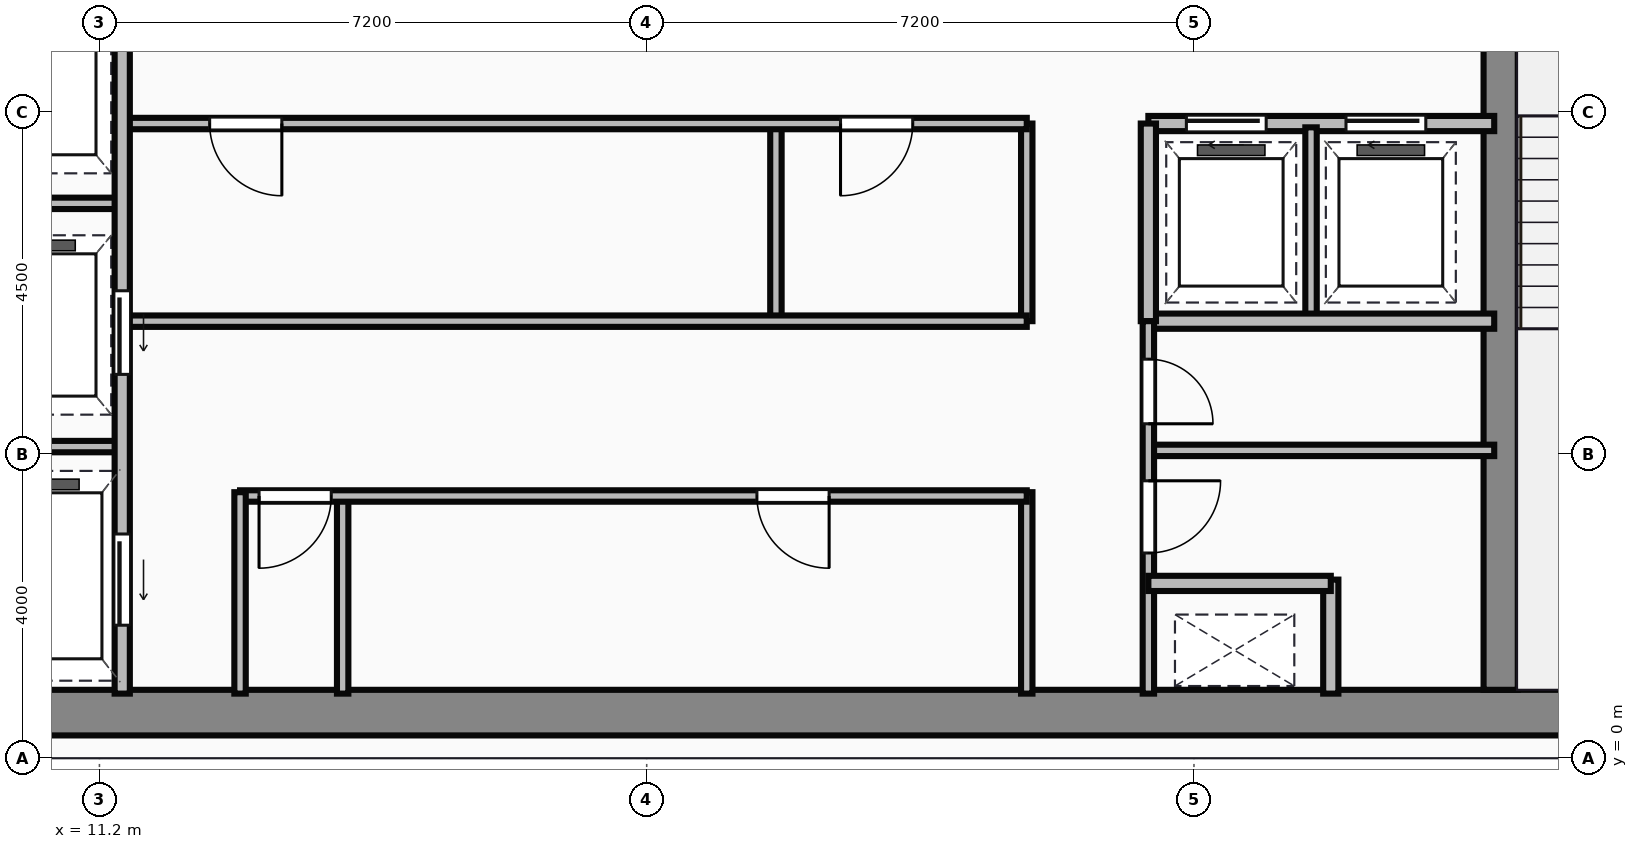
"""IFC4 building model, lengths in metres.
Left out: names, types, materials, properties, quantities, classifications, styles, units other than length and angle.
Written with IfcOpenShell. Run it as: python <this file> out.ifc"""

import sys

from ifc_helpers import new_model, si_unit, direction, frame, frame_2d, origin, place, context, subcontext, project, spatial, rectangle, extrude, source, transform, mapped, element, fill, save


model = new_model("IFC4")
c1 = context("Model", 3, precision=1e-05, world=origin(), true_north=direction((0.0, 1.0)))
c2 = subcontext(c1, "Body", "Model", "MODEL_VIEW")
j1 = project(units=[si_unit("LENGTHUNIT", "METRE"), si_unit("PLANEANGLEUNIT", "RADIAN")], contexts=[c1])
p1 = place(None, origin())
s1 = spatial("IfcSite", under=j1, at=p1, CompositionType="ELEMENT")
p2 = place(p1, origin())
s2 = spatial("IfcBuilding", under=s1, at=p2, CompositionType="ELEMENT")
p3 = place(p2, frame((0.0, 0.0, 273.4)))
s3 = spatial("IfcBuildingStorey", under=s2, at=p3, CompositionType="ELEMENT", Elevation=273.4)
m1 = source(origin(), c2, "Body", "SweptSolid", [
    extrude(rectangle(XDim=29.5, YDim=0.6, at=frame_2d((14.75, 0.0))), origin(), (0.0, 0.0, 1.0), 3.65),
])
p4 = place(p3, frame((4.5, 0.6, 0.0), z_axis=(0.0, 0.0, 1.0), x_axis=(1.0, 0.0, 0.0)))
e1 = element("IfcWall", 1, at=p4, inside=s3, PredefinedType="SHEAR", context=c2, shape_type="MappedRepresentation", body=[
    mapped(m1, transform((0.0, 0.0, 0.0))),
])
m2 = source(origin(), c2, "Body", "SweptSolid", [
    extrude(rectangle(XDim=12.5, YDim=0.45, at=frame_2d((6.25, 0.0))), origin(), (0.0, 0.0, 1.0), 3.65),
])
p5 = place(p3, frame((29.635, 0.9, 0.0), z_axis=(0.0, 0.0, 1.0), x_axis=(0.0, 1.0, 0.0)))
e2 = element("IfcWall", 2, at=p5, inside=s3, PredefinedType="SHEAR", context=c2, shape_type="MappedRepresentation", body=[
    mapped(m2, transform((0.0, 0.0, 0.0))),
])
m3 = source(origin(), c2, "Body", "SweptSolid", [
    extrude(rectangle(XDim=9.6, YDim=0.2, at=frame_2d((4.8, 0.0))), origin(), (0.0, 0.0, 1.0), 3.4),
])
p6 = place(p3, frame((11.5, 0.85, 0.0), z_axis=(0.0, 0.0, 1.0), x_axis=(0.0, 1.0, 0.0)))
e3 = element("IfcWall", 3, at=p6, inside=s3, PredefinedType="PARTITIONING", context=c2, shape_type="MappedRepresentation", body=[
    mapped(m3, transform((0.0, 0.0, 0.0))),
])
p7 = place(p6, frame((4.2, 0.0, 0.0)))
e4 = element("IfcOpeningElement", 4, at=p7, cuts=e3, PredefinedType="OPENING", context=c2, shape_type="SweptSolid", body=[
    extrude(rectangle(XDim=1.1, YDim=2.15, at=frame_2d((0.55, 1.075))), frame((0.0, 0.11, 0.0), z_axis=(0.0, -1.0, 0.0), x_axis=(1.0, 0.0, 0.0)), (0.0, 0.0, 1.0), 0.22),
])
p8 = place(p6, frame((0.9, 0.0, 0.0)))
e5 = element("IfcOpeningElement", 5, at=p8, cuts=e3, PredefinedType="OPENING", context=c2, shape_type="SweptSolid", body=[
    extrude(rectangle(XDim=1.2, YDim=2.15, at=frame_2d((0.6, 1.075))), frame((0.0, 0.11, 0.0), z_axis=(0.0, -1.0, 0.0), x_axis=(1.0, 0.0, 0.0)), (0.0, 0.0, 1.0), 0.22),
])
m4 = source(origin(), c2, "Body", "SweptSolid", [
    extrude(rectangle(XDim=2.4, YDim=0.15, at=frame_2d((1.2, 0.0))), origin(), (0.0, 0.0, 1.0), 3.4),
])
for number, where, z_axis, x_axis in (
    (6, (9.1, 4.1, 0.0), (0.0, 0.0, 1.0), (1.0, 0.0, 0.0)),
    (7, (9.1, 7.3, 0.0), (0.0, 0.0, 1.0), (1.0, 0.0, 0.0)),
):
    element("IfcWall", number, at=place(p3, frame(where, z_axis=z_axis, x_axis=x_axis)), inside=s3, PredefinedType="PARTITIONING", context=c2, shape_type="MappedRepresentation", body=[
        mapped(m4, transform((0.0, 0.0, 0.0))),
    ])
m5 = source(origin(), c2, "Body", "SweptSolid", [
    extrude(rectangle(XDim=2.65, YDim=0.15, at=frame_2d((1.325, 0.0))), origin(), (0.0, 0.0, 1.0), 3.4),
])
p9 = place(p3, frame((13.05, 0.85, 0.0), z_axis=(0.0, 0.0, 1.0), x_axis=(0.0, 1.0, 0.0)))
e8 = element("IfcWall", 8, at=p9, inside=s3, PredefinedType="PARTITIONING", context=c2, shape_type="MappedRepresentation", body=[
    mapped(m5, transform((0.0, 0.0, 0.0))),
])
m6 = source(origin(), c2, "Body", "SweptSolid", [
    extrude(rectangle(XDim=10.35, YDim=0.15, at=frame_2d((5.175, 0.0))), origin(), (0.0, 0.0, 1.0), 3.4),
])
p10 = place(p3, frame((13.05, 3.45, 0.0), z_axis=(0.0, 0.0, 1.0), x_axis=(1.0, 0.0, 0.0)))
e9 = element("IfcWall", 9, at=p10, inside=s3, PredefinedType="PARTITIONING", context=c2, shape_type="MappedRepresentation", body=[
    mapped(m6, transform((0.0, 0.0, 0.0))),
])
p11 = place(p10, frame((0.25, 0.0, 0.0)))
e10 = element("IfcOpeningElement", 10, at=p11, cuts=e9, PredefinedType="OPENING", context=c2, shape_type="SweptSolid", body=[
    extrude(rectangle(XDim=0.95, YDim=2.15, at=frame_2d((0.475, 1.075))), frame((0.0, 0.085, 0.0), z_axis=(0.0, -1.0, 0.0), x_axis=(1.0, 0.0, 0.0)), (0.0, 0.0, 1.0), 0.17),
])
p12 = place(p10, frame((6.8, 0.0, 0.0)))
e11 = element("IfcOpeningElement", 11, at=p12, cuts=e9, PredefinedType="OPENING", context=c2, shape_type="SweptSolid", body=[
    extrude(rectangle(XDim=0.95, YDim=2.15, at=frame_2d((0.475, 1.075))), frame((0.0, 0.085, 0.0), z_axis=(0.0, -1.0, 0.0), x_axis=(1.0, 0.0, 0.0)), (0.0, 0.0, 1.0), 0.17),
])
p13 = place(p3, frame((23.4, 0.85, 0.0), z_axis=(0.0, 0.0, 1.0), x_axis=(0.0, 1.0, 0.0)))
e12 = element("IfcWall", 12, at=p13, inside=s3, PredefinedType="PARTITIONING", context=c2, shape_type="MappedRepresentation", body=[
    mapped(m5, transform((0.0, 0.0, 0.0))),
])
m7 = source(origin(), c2, "Body", "SweptSolid", [
    extrude(rectangle(XDim=2.6, YDim=0.15, at=frame_2d((1.3, 0.0))), origin(), (0.0, 0.0, 1.0), 3.4),
])
p14 = place(p3, frame((14.4, 0.85, 0.0), z_axis=(0.0, 0.0, 1.0), x_axis=(0.0, 1.0, 0.0)))
e13 = element("IfcWall", 13, at=p14, inside=s3, PredefinedType="PARTITIONING", context=c2, shape_type="MappedRepresentation", body=[
    mapped(m7, transform((0.0, 0.0, 0.0))),
])
m8 = source(origin(), c2, "Body", "SweptSolid", [
    extrude(rectangle(XDim=11.85, YDim=0.15, at=frame_2d((5.925, 0.0))), origin(), (0.0, 0.0, 1.0), 3.4),
])
p15 = place(p3, frame((11.55, 5.75, 0.0), z_axis=(0.0, 0.0, 1.0), x_axis=(1.0, 0.0, 0.0)))
e14 = element("IfcWall", 14, at=p15, inside=s3, PredefinedType="PARTITIONING", context=c2, shape_type="MappedRepresentation", body=[
    mapped(m8, transform((0.0, 0.0, 0.0))),
])
p16 = place(p3, frame((11.55, 8.35, 0.0), z_axis=(0.0, 0.0, 1.0), x_axis=(1.0, 0.0, 0.0)))
e15 = element("IfcWall", 15, at=p16, inside=s3, PredefinedType="PARTITIONING", context=c2, shape_type="MappedRepresentation", body=[
    mapped(m8, transform((0.0, 0.0, 0.0))),
])
p17 = place(p16, frame((1.1, 0.0, 0.0)))
e16 = element("IfcOpeningElement", 16, at=p17, cuts=e15, PredefinedType="OPENING", context=c2, shape_type="SweptSolid", body=[
    extrude(rectangle(XDim=0.95, YDim=2.15, at=frame_2d((0.475, 1.075))), frame((0.0, 0.085, 0.0), z_axis=(0.0, -1.0, 0.0), x_axis=(1.0, 0.0, 0.0)), (0.0, 0.0, 1.0), 0.17),
])
p18 = place(p16, frame((9.4, 0.0, 0.0)))
e17 = element("IfcOpeningElement", 17, at=p18, cuts=e15, PredefinedType="OPENING", context=c2, shape_type="SweptSolid", body=[
    extrude(rectangle(XDim=0.95, YDim=2.15, at=frame_2d((0.475, 1.075))), frame((0.0, 0.085, 0.0), z_axis=(0.0, -1.0, 0.0), x_axis=(1.0, 0.0, 0.0)), (0.0, 0.0, 1.0), 0.17),
])
m9 = source(origin(), c2, "Body", "SweptSolid", [
    extrude(rectangle(XDim=2.6, YDim=0.15, at=frame_2d((1.3, 0.0))), origin(), (0.0, 0.0, 1.0), 3.4),
])
p19 = place(p3, frame((23.4, 5.75, 0.0), z_axis=(0.0, 0.0, 1.0), x_axis=(0.0, 1.0, 0.0)))
e18 = element("IfcWall", 18, at=p19, inside=s3, PredefinedType="PARTITIONING", context=c2, shape_type="MappedRepresentation", body=[
    mapped(m9, transform((0.0, 0.0, 0.0))),
])
m10 = source(origin(), c2, "Body", "SweptSolid", [
    extrude(rectangle(XDim=2.5, YDim=0.15, at=frame_2d((1.25, 0.0))), origin(), (0.0, 0.0, 1.0), 3.4),
])
p20 = place(p3, frame((20.1, 5.8, 0.0), z_axis=(0.0, 0.0, 1.0), x_axis=(0.0, 1.0, 0.0)))
e19 = element("IfcWall", 19, at=p20, inside=s3, PredefinedType="PARTITIONING", context=c2, shape_type="MappedRepresentation", body=[
    mapped(m10, transform((0.0, 0.0, 0.0))),
])
m11 = source(origin(), c2, "Body", "SweptSolid", [
    extrude(rectangle(XDim=4.55, YDim=0.2, at=frame_2d((2.275, 0.0))), origin(), (0.0, 0.0, 1.0), 3.4),
])
p21 = place(p3, frame((25.0, 8.35, 0.0), z_axis=(0.0, 0.0, 1.0), x_axis=(1.0, 0.0, 0.0)))
e20 = element("IfcWall", 20, at=p21, inside=s3, PredefinedType="PARTITIONING", context=c2, shape_type="MappedRepresentation", body=[
    mapped(m11, transform((0.0, 0.0, 0.0))),
])
p22 = place(p21, frame((0.5, 0.0, 0.0)))
e21 = element("IfcOpeningElement", 21, at=p22, cuts=e20, PredefinedType="OPENING", context=c2, shape_type="SweptSolid", body=[
    extrude(rectangle(XDim=1.05, YDim=2.15, at=frame_2d((0.525, 1.075))), frame((0.0, 0.11, 0.0), z_axis=(0.0, -1.0, 0.0), x_axis=(1.0, 0.0, 0.0)), (0.0, 0.0, 1.0), 0.22),
])
p23 = place(p21, frame((2.6, 0.0, 0.0)))
e22 = element("IfcOpeningElement", 22, at=p23, cuts=e20, PredefinedType="OPENING", context=c2, shape_type="SweptSolid", body=[
    extrude(rectangle(XDim=1.05, YDim=2.15, at=frame_2d((0.525, 1.075))), frame((0.0, 0.11, 0.0), z_axis=(0.0, -1.0, 0.0), x_axis=(1.0, 0.0, 0.0)), (0.0, 0.0, 1.0), 0.22),
])
p24 = place(p3, frame((25.0, 5.75, 0.0), z_axis=(0.0, 0.0, 1.0), x_axis=(1.0, 0.0, 0.0)))
e23 = element("IfcWall", 23, at=p24, inside=s3, PredefinedType="PARTITIONING", context=c2, shape_type="MappedRepresentation", body=[
    mapped(m11, transform((0.0, 0.0, 0.0))),
])
m12 = source(origin(), c2, "Body", "SweptSolid", [
    extrude(rectangle(XDim=2.6, YDim=0.2, at=frame_2d((1.3, 0.0))), origin(), (0.0, 0.0, 1.0), 3.4),
])
p25 = place(p3, frame((25.0, 5.75, 0.0), z_axis=(0.0, 0.0, 1.0), x_axis=(0.0, 1.0, 0.0)))
e24 = element("IfcWall", 24, at=p25, inside=s3, PredefinedType="PARTITIONING", context=c2, shape_type="MappedRepresentation", body=[
    mapped(m12, transform((0.0, 0.0, 0.0))),
])
p26 = place(p3, frame((27.14, 5.8, 0.0), z_axis=(0.0, 0.0, 1.0), x_axis=(0.0, 1.0, 0.0)))
e25 = element("IfcWall", 25, at=p26, inside=s3, PredefinedType="PARTITIONING", context=c2, shape_type="MappedRepresentation", body=[
    mapped(m10, transform((0.0, 0.0, 0.0))),
])
m13 = source(origin(), c2, "Body", "SweptSolid", [
    extrude(rectangle(XDim=4.9, YDim=0.15, at=frame_2d((2.45, 0.0))), origin(), (0.0, 0.0, 1.0), 3.4),
])
p27 = place(p3, frame((25.0, 0.85, 0.0), z_axis=(0.0, 0.0, 1.0), x_axis=(0.0, 1.0, 0.0)))
e26 = element("IfcWall", 26, at=p27, inside=s3, PredefinedType="PARTITIONING", context=c2, shape_type="MappedRepresentation", body=[
    mapped(m13, transform((0.0, 0.0, 0.0))),
])
p28 = place(p27, frame((1.85, 0.0, 0.0)))
e27 = element("IfcOpeningElement", 27, at=p28, cuts=e26, PredefinedType="OPENING", context=c2, shape_type="SweptSolid", body=[
    extrude(rectangle(XDim=0.95, YDim=2.15, at=frame_2d((0.475, 1.075))), frame((0.0, 0.085, 0.0), z_axis=(0.0, -1.0, 0.0), x_axis=(1.0, 0.0, 0.0)), (0.0, 0.0, 1.0), 0.17),
])
p29 = place(p27, frame((3.55, 0.0, 0.0)))
e28 = element("IfcOpeningElement", 28, at=p29, cuts=e26, PredefinedType="OPENING", context=c2, shape_type="SweptSolid", body=[
    extrude(rectangle(XDim=0.85, YDim=2.15, at=frame_2d((0.425, 1.075))), frame((0.0, 0.085, 0.0), z_axis=(0.0, -1.0, 0.0), x_axis=(1.0, 0.0, 0.0)), (0.0, 0.0, 1.0), 0.17),
])
m14 = source(origin(), c2, "Body", "SweptSolid", [
    extrude(rectangle(XDim=2.4, YDim=0.2, at=frame_2d((1.2, 0.0))), origin(), (0.0, 0.0, 1.0), 3.4),
])
p30 = place(p3, frame((25.0, 2.3, 0.0), z_axis=(0.0, 0.0, 1.0), x_axis=(1.0, 0.0, 0.0)))
e29 = element("IfcWall", 29, at=p30, inside=s3, PredefinedType="PARTITIONING", context=c2, shape_type="MappedRepresentation", body=[
    mapped(m14, transform((0.0, 0.0, 0.0))),
])
m15 = source(origin(), c2, "Body", "SweptSolid", [
    extrude(rectangle(XDim=1.5, YDim=0.2, at=frame_2d((0.75, 0.0))), origin(), (0.0, 0.0, 1.0), 3.4),
])
p31 = place(p3, frame((27.4, 0.85, 0.0), z_axis=(0.0, 0.0, 1.0), x_axis=(0.0, 1.0, 0.0)))
e30 = element("IfcWall", 30, at=p31, inside=s3, PredefinedType="PARTITIONING", context=c2, shape_type="MappedRepresentation", body=[
    mapped(m15, transform((0.0, 0.0, 0.0))),
])
m16 = source(origin(), c2, "Body", "SweptSolid", [
    extrude(rectangle(XDim=4.55, YDim=0.15, at=frame_2d((2.275, 0.0))), origin(), (0.0, 0.0, 1.0), 3.4),
])
p32 = place(p3, frame((25.0, 4.05, 0.0), z_axis=(0.0, 0.0, 1.0), x_axis=(1.0, 0.0, 0.0)))
e31 = element("IfcWall", 31, at=p32, inside=s3, PredefinedType="PARTITIONING", context=c2, shape_type="MappedRepresentation", body=[
    mapped(m16, transform((0.0, 0.0, 0.0))),
])
m17 = source(origin(), c2, "Body", "SweptSolid", [
    extrude(rectangle(XDim=1.1, YDim=2.15, at=frame_2d((0.55, 1.075))), frame((0.0, 0.025, 0.0), z_axis=(0.0, -1.0, 0.0), x_axis=(1.0, 0.0, 0.0)), (0.0, 0.0, 1.0), 0.05),
])
p33 = place(p7, frame((1.1, 0.0, 0.0), z_axis=(0.0, 0.0, 1.0), x_axis=(-1.0, 0.0, 0.0)))
e32 = element("IfcDoor", 32, at=p33, inside=s3, OperationType="SLIDING_TO_LEFT", PredefinedType="DOOR", context=c2, shape_type="MappedRepresentation", body=[
    mapped(m17, transform((0.0, 0.0, 0.0))),
])
fill(e4, e32)
m18 = source(origin(), c2, "Body", "SweptSolid", [
    extrude(rectangle(XDim=1.2, YDim=2.15, at=frame_2d((0.6, 1.075))), frame((0.0, 0.025, 0.0), z_axis=(0.0, -1.0, 0.0), x_axis=(1.0, 0.0, 0.0)), (0.0, 0.0, 1.0), 0.05),
])
p34 = place(p8, frame((1.2, 0.0, 0.0), z_axis=(0.0, 0.0, 1.0), x_axis=(-1.0, 0.0, 0.0)))
e33 = element("IfcDoor", 33, at=p34, inside=s3, OperationType="SLIDING_TO_LEFT", PredefinedType="DOOR", context=c2, shape_type="MappedRepresentation", body=[
    mapped(m18, transform((0.0, 0.0, 0.0))),
])
fill(e5, e33)
m19 = source(origin(), c2, "Body", "SweptSolid", [
    extrude(rectangle(XDim=0.95, YDim=2.15, at=frame_2d((0.475, 1.075))), frame((0.0, 0.025, 0.0), z_axis=(0.0, -1.0, 0.0), x_axis=(1.0, 0.0, 0.0)), (0.0, 0.0, 1.0), 0.05),
])
p35 = place(p11, origin())
e34 = element("IfcDoor", 34, at=p35, inside=s3, OperationType="SINGLE_SWING_LEFT", PredefinedType="DOOR", context=c2, shape_type="MappedRepresentation", body=[
    mapped(m19, transform((0.0, 0.0, 0.0))),
])
fill(e10, e34)
p36 = place(p12, origin())
e35 = element("IfcDoor", 35, at=p36, inside=s3, OperationType="SINGLE_SWING_RIGHT", PredefinedType="DOOR", context=c2, shape_type="MappedRepresentation", body=[
    mapped(m19, transform((0.0, 0.0, 0.0))),
])
fill(e11, e35)
p37 = place(p17, origin())
e36 = element("IfcDoor", 36, at=p37, inside=s3, OperationType="SINGLE_SWING_RIGHT", PredefinedType="DOOR", context=c2, shape_type="MappedRepresentation", body=[
    mapped(m19, transform((0.0, 0.0, 0.0))),
])
fill(e16, e36)
p38 = place(p18, origin())
e37 = element("IfcDoor", 37, at=p38, inside=s3, OperationType="SINGLE_SWING_LEFT", PredefinedType="DOOR", context=c2, shape_type="MappedRepresentation", body=[
    mapped(m19, transform((0.0, 0.0, 0.0))),
])
fill(e17, e37)
m20 = source(origin(), c2, "Body", "SweptSolid", [
    extrude(rectangle(XDim=1.05, YDim=2.15, at=frame_2d((0.525, 1.075))), frame((0.0, 0.025, 0.0), z_axis=(0.0, -1.0, 0.0), x_axis=(1.0, 0.0, 0.0)), (0.0, 0.0, 1.0), 0.05),
])
p39 = place(p22, origin())
e38 = element("IfcDoor", 38, at=p39, inside=s3, OperationType="SLIDING_TO_LEFT", PredefinedType="DOOR", context=c2, shape_type="MappedRepresentation", body=[
    mapped(m20, transform((0.0, 0.0, 0.0))),
])
fill(e21, e38)
p40 = place(p23, origin())
e39 = element("IfcDoor", 39, at=p40, inside=s3, OperationType="SLIDING_TO_LEFT", PredefinedType="DOOR", context=c2, shape_type="MappedRepresentation", body=[
    mapped(m20, transform((0.0, 0.0, 0.0))),
])
fill(e22, e39)
p41 = place(p28, origin())
e40 = element("IfcDoor", 40, at=p41, inside=s3, OperationType="SINGLE_SWING_RIGHT", PredefinedType="DOOR", context=c2, shape_type="MappedRepresentation", body=[
    mapped(m19, transform((0.0, 0.0, 0.0))),
])
fill(e27, e40)
m21 = source(origin(), c2, "Body", "SweptSolid", [
    extrude(rectangle(XDim=0.85, YDim=2.15, at=frame_2d((0.425, 1.075))), frame((0.0, 0.025, 0.0), z_axis=(0.0, -1.0, 0.0), x_axis=(1.0, 0.0, 0.0)), (0.0, 0.0, 1.0), 0.05),
])
p42 = place(p29, origin())
e41 = element("IfcDoor", 41, at=p42, inside=s3, OperationType="SINGLE_SWING_LEFT", PredefinedType="DOOR", context=c2, shape_type="MappedRepresentation", body=[
    mapped(m21, transform((0.0, 0.0, 0.0))),
])
fill(e28, e41)
save(model, sys.argv[1])
